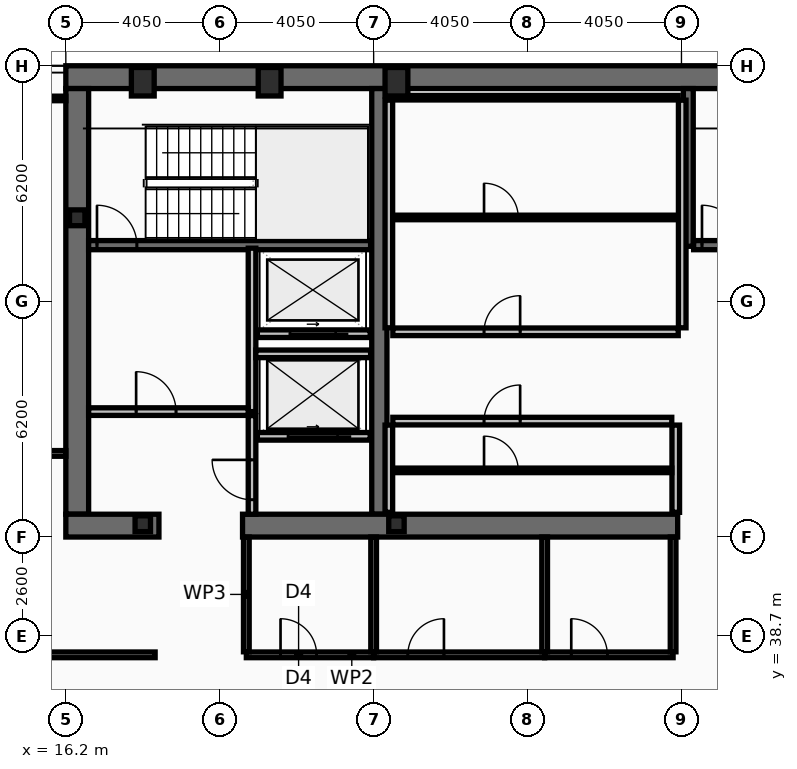
"""IFC4 building model, lengths in metres.
Left out: names, types, materials, properties, quantities, classifications, styles, units other than length and angle.
Written with IfcOpenShell. Run it as: python <this file> out.ifc"""

import sys

from ifc_helpers import new_model, si_unit, direction, frame, frame_2d, origin, origin_2d, place, context, subcontext, project, spatial, rectangle, hollow_rectangle, i_section, extrude, element, fill, save


model = new_model("IFC4")
c1 = context("Model", 3, precision=1e-05, world=origin(), true_north=direction((0.0, 1.0)))
c2 = subcontext(c1, "Body", "Model", "MODEL_VIEW")
j1 = project(units=[si_unit("LENGTHUNIT", "METRE"), si_unit("PLANEANGLEUNIT", "RADIAN")], contexts=[c1])
p1 = place(None, origin())
s1 = spatial("IfcSite", under=j1, at=p1, CompositionType="ELEMENT")
p2 = place(p1, origin())
s2 = spatial("IfcBuilding", under=s1, at=p2, CompositionType="ELEMENT")
p3 = place(p2, frame((0.0, 0.0, 195.8)))
s3 = spatial("IfcBuildingStorey", under=s2, at=p3, CompositionType="ELEMENT", Elevation=195.8)
p4 = place(p3, frame((16.2, 53.4, 0.0), z_axis=(0.0, 0.0, 1.0), x_axis=(1.0, 0.0, 0.0)))
e1 = element("IfcWall", 1, at=p4, inside=s3, PredefinedType="SHEAR", context=c2, shape_type="SweptSolid", body=[
    extrude(rectangle(XDim=40.5, YDim=0.6, at=frame_2d((20.25, 0.0))), origin(), (0.0, 0.0, 1.0), 3.44),
])
p5 = place(p3, frame((16.5, 41.9, 0.0), z_axis=(0.0, 0.0, 1.0), x_axis=(0.0, 1.0, 0.0)))
e2 = element("IfcWall", 2, at=p5, inside=s3, PredefinedType="SHEAR", context=c2, shape_type="SweptSolid", body=[
    extrude(rectangle(XDim=11.2, YDim=0.6, at=frame_2d((5.6, 0.0))), origin(), (0.0, 0.0, 1.0), 3.44),
])
p6 = place(p3, frame((24.45, 41.9, 0.0), z_axis=(0.0, 0.0, 1.0), x_axis=(0.0, 1.0, 0.0)))
e3 = element("IfcWall", 3, at=p6, inside=s3, PredefinedType="SHEAR", context=c2, shape_type="SweptSolid", body=[
    extrude(rectangle(XDim=11.2, YDim=0.4, at=frame_2d((5.6, 0.0))), origin(), (0.0, 0.0, 1.0), 3.44),
])
p7 = place(p3, frame((18.65, 41.6, 0.0), z_axis=(0.0, 0.0, 1.0), x_axis=(-1.0, 0.0, 0.0)))
e4 = element("IfcWall", 4, at=p7, inside=s3, PredefinedType="SHEAR", context=c2, shape_type="SweptSolid", body=[
    extrude(rectangle(XDim=2.45, YDim=0.6, at=frame_2d((1.225, 0.0))), origin(), (0.0, 0.0, 1.0), 3.44),
])
p8 = place(p3, frame((32.3, 41.6, 0.0), z_axis=(0.0, 0.0, 1.0), x_axis=(-1.0, 0.0, 0.0)))
e5 = element("IfcWall", 5, at=p8, inside=s3, PredefinedType="SHEAR", context=c2, shape_type="SweptSolid", body=[
    extrude(rectangle(XDim=11.45, YDim=0.6, at=frame_2d((5.725, 0.0))), origin(), (0.0, 0.0, 1.0), 3.44),
])
p9 = place(p3, frame((32.58, 48.95, 0.0), z_axis=(0.0, 0.0, 1.0), x_axis=(0.0, 1.0, 0.0)))
e6 = element("IfcWall", 6, at=p9, inside=s3, PredefinedType="SHEAR", context=c2, shape_type="SweptSolid", body=[
    extrude(rectangle(XDim=4.15, YDim=0.26, at=frame_2d((2.075, 0.0))), origin(), (0.0, 0.0, 1.0), 3.44),
])
p10 = place(p3, frame((16.8, 48.98, 0.0), z_axis=(0.0, 0.0, 1.0), x_axis=(1.0, 0.0, 0.0)))
e7 = element("IfcWall", 7, at=p10, inside=s3, PredefinedType="SHEAR", context=c2, shape_type="SweptSolid", body=[
    extrude(rectangle(XDim=7.42, YDim=0.24, at=frame_2d((3.71, 0.0))), origin(), (0.0, 0.0, 1.0), 3.44),
])
p11 = place(p10, frame((0.22, 0.0, 0.0)))
e8 = element("IfcOpeningElement", 8, at=p11, cuts=e7, PredefinedType="OPENING", context=c2, shape_type="SweptSolid", body=[
    extrude(rectangle(XDim=1.05, YDim=2.15, at=frame_2d((0.525, 1.075))), frame((0.0, 0.13, 0.0), z_axis=(0.0, -1.0, 0.0), x_axis=(1.0, 0.0, 0.0)), (0.0, 0.0, 1.0), 0.26),
])
p12 = place(p3, frame((32.72, 48.98, 0.0), z_axis=(0.0, 0.0, 1.0), x_axis=(1.0, 0.0, 0.0)))
e9 = element("IfcWall", 9, at=p12, inside=s3, PredefinedType="SHEAR", context=c2, shape_type="SweptSolid", body=[
    extrude(rectangle(XDim=7.56, YDim=0.24, at=frame_2d((3.78, 0.0))), origin(), (0.0, 0.0, 1.0), 3.44),
])
p13 = place(p12, frame((0.22, 0.0, 0.0)))
e10 = element("IfcOpeningElement", 10, at=p13, cuts=e9, PredefinedType="OPENING", context=c2, shape_type="SweptSolid", body=[
    extrude(rectangle(XDim=1.05, YDim=2.15, at=frame_2d((0.525, 1.075))), frame((0.0, 0.13, 0.0), z_axis=(0.0, -1.0, 0.0), x_axis=(1.0, 0.0, 0.0)), (0.0, 0.0, 1.0), 0.26),
])
for number, where, z_axis, x_axis in (
    (11, (18.225, 53.28, 0.0), (0.0, 0.0, 1.0), (1.0, 0.0, 0.0)),
    (12, (21.562, 53.28, 0.0), (0.0, 0.0, 1.0), (1.0, 0.0, 0.0)),
    (13, (24.9, 53.28, 0.0), (0.0, 0.0, 1.0), (1.0, 0.0, 0.0)),
):
    element("IfcColumn", number, at=place(p3, frame(where, z_axis=z_axis, x_axis=x_axis)), inside=s3, PredefinedType="COLUMN", context=c2, shape_type="SweptSolid", body=[
        extrude(hollow_rectangle(XDim=0.6, YDim=0.75, WallThickness=0.045, at=origin_2d()), origin(), (0.0, 0.0, 1.0), 3.6),
    ])
for number, where, z_axis, x_axis in (
    (14, (16.5, 49.7, 0.0), (0.0, 0.0, 1.0), (1.0, 0.0, 0.0)),
    (15, (18.225, 41.65, 0.0), (0.0, 0.0, 1.0), (1.0, 0.0, 0.0)),
    (16, (24.9, 41.65, 0.0), (0.0, 0.0, 1.0), (1.0, 0.0, 0.0)),
):
    element("IfcColumn", number, at=place(p3, frame(where, z_axis=z_axis, x_axis=x_axis)), inside=s3, PredefinedType="COLUMN", context=c2, shape_type="SweptSolid", body=[
        extrude(i_section(OverallWidth=0.406, OverallDepth=0.416, WebThickness=0.03, FlangeThickness=0.048, at=origin_2d()), origin(), (0.0, 0.0, 1.0), 3.6),
    ])
p14 = place(p3, frame((24.21, 43.95, 0.0), z_axis=(0.0, 0.0, 1.0), x_axis=(-1.0, 0.0, 0.0)))
e17 = element("IfcWall", 17, at=p14, inside=s3, PredefinedType="PARTITIONING", context=c2, shape_type="SweptSolid", body=[
    extrude(rectangle(XDim=2.97, YDim=0.2, at=frame_2d((1.485, 0.0))), origin(), (0.0, 0.0, 1.0), 3.44),
])
p15 = place(p14, frame((0.86, 0.0, 0.0)))
e18 = element("IfcOpeningElement", 18, at=p15, cuts=e17, PredefinedType="OPENING", context=c2, shape_type="SweptSolid", body=[
    extrude(rectangle(XDim=1.3, YDim=2.18, at=frame_2d((0.65, 1.09))), frame((0.0, 0.11, 0.0), z_axis=(0.0, -1.0, 0.0), x_axis=(1.0, 0.0, 0.0)), (0.0, 0.0, 1.0), 0.22),
])
p16 = place(p3, frame((24.21, 46.65, 0.0), z_axis=(0.0, 0.0, 1.0), x_axis=(-1.0, 0.0, 0.0)))
e19 = element("IfcWall", 19, at=p16, inside=s3, PredefinedType="PARTITIONING", context=c2, shape_type="SweptSolid", body=[
    extrude(rectangle(XDim=2.97, YDim=0.2, at=frame_2d((1.485, 0.0))), origin(), (0.0, 0.0, 1.0), 3.44),
])
p17 = place(p16, frame((0.91, 0.0, 0.0)))
e20 = element("IfcOpeningElement", 20, at=p17, cuts=e19, PredefinedType="OPENING", context=c2, shape_type="SweptSolid", body=[
    extrude(rectangle(XDim=1.2, YDim=2.18, at=frame_2d((0.6, 1.09))), frame((0.0, 0.11, 0.0), z_axis=(0.0, -1.0, 0.0), x_axis=(1.0, 0.0, 0.0)), (0.0, 0.0, 1.0), 0.22),
])
p18 = place(p3, frame((21.1, 44.6, 0.0), z_axis=(0.0, 0.0, 1.0), x_axis=(0.0, 1.0, 0.0)))
e21 = element("IfcWall", 21, at=p18, inside=s3, PredefinedType="PARTITIONING", context=c2, shape_type="SweptSolid", body=[
    extrude(rectangle(XDim=4.3, YDim=0.2, at=frame_2d((2.15, 0.0))), origin(), (0.0, 0.0, 1.0), 3.44),
])
p19 = place(p3, frame((16.8, 44.6, 0.0), z_axis=(0.0, 0.0, 1.0), x_axis=(1.0, 0.0, 0.0)))
e22 = element("IfcWall", 22, at=p19, inside=s3, PredefinedType="PARTITIONING", context=c2, shape_type="SweptSolid", body=[
    extrude(rectangle(XDim=4.2, YDim=0.2, at=frame_2d((2.1, 0.0))), origin(), (0.0, 0.0, 1.0), 3.44),
])
p20 = place(p19, frame((1.25, 0.0, 0.0)))
e23 = element("IfcOpeningElement", 23, at=p20, cuts=e22, PredefinedType="OPENING", context=c2, shape_type="SweptSolid", body=[
    extrude(rectangle(XDim=1.05, YDim=2.15, at=frame_2d((0.525, 1.075))), frame((0.0, 0.11, 0.0), z_axis=(0.0, -1.0, 0.0), x_axis=(1.0, 0.0, 0.0)), (0.0, 0.0, 1.0), 0.22),
])
p21 = place(p3, frame((21.2, 46.12, 0.0), z_axis=(0.0, 0.0, 1.0), x_axis=(1.0, 0.0, 0.0)))
e24 = element("IfcWall", 24, at=p21, inside=s3, PredefinedType="PARTITIONING", context=c2, shape_type="SweptSolid", body=[
    extrude(rectangle(XDim=3.02, YDim=0.2, at=frame_2d((1.51, 0.0))), origin(), (0.0, 0.0, 1.0), 3.44),
])
p22 = place(p3, frame((21.1, 41.9, 0.0), z_axis=(0.0, 0.0, 1.0), x_axis=(0.0, 1.0, 0.0)))
e25 = element("IfcWall", 25, at=p22, inside=s3, PredefinedType="PARTITIONING", context=c2, shape_type="SweptSolid", body=[
    extrude(rectangle(XDim=2.595, YDim=0.2, at=frame_2d((1.298, 0.0))), origin(), (0.0, 0.0, 1.0), 3.44),
])
p23 = place(p22, frame((0.38, 0.0, 0.0)))
e26 = element("IfcOpeningElement", 26, at=p23, cuts=e25, PredefinedType="OPENING", context=c2, shape_type="SweptSolid", body=[
    extrude(rectangle(XDim=1.05, YDim=2.15, at=frame_2d((0.525, 1.075))), frame((0.0, 0.11, 0.0), z_axis=(0.0, -1.0, 0.0), x_axis=(1.0, 0.0, 0.0)), (0.0, 0.0, 1.0), 0.22),
])
for number, where, z_axis, x_axis in (
    (27, (24.7, 46.805, 0.0), (0.0, 0.0, 1.0), (0.0, 1.0, 0.0)),
    (28, (32.42, 46.805, 0.0), (0.0, 0.0, 1.0), (0.0, 1.0, 0.0)),
):
    element("IfcWall", number, at=place(p3, frame(where, z_axis=z_axis, x_axis=x_axis)), inside=s3, PredefinedType="PARTITIONING", context=c2, shape_type="SweptSolid", body=[
        extrude(rectangle(XDim=5.99, YDim=0.2, at=frame_2d((2.995, 0.0))), origin(), (0.0, 0.0, 1.0), 3.44),
    ])
p24 = place(p3, frame((24.805, 52.86, 0.0), z_axis=(0.0, 0.0, 1.0), x_axis=(1.0, 0.0, 0.0)))
e29 = element("IfcWall", 29, at=p24, inside=s3, PredefinedType="PARTITIONING", context=c2, shape_type="SweptSolid", body=[
    extrude(rectangle(XDim=7.51, YDim=0.12, at=frame_2d((3.755, 0.0))), origin(), (0.0, 0.0, 1.0), 3.44),
])
p25 = place(p3, frame((24.805, 49.709, 0.0), z_axis=(0.0, 0.0, 1.0), x_axis=(1.0, 0.0, 0.0)))
e30 = element("IfcWall", 30, at=p25, inside=s3, PredefinedType="PARTITIONING", context=c2, shape_type="SweptSolid", body=[
    extrude(rectangle(XDim=7.51, YDim=0.12, at=frame_2d((3.755, 0.0))), origin(), (0.0, 0.0, 1.0), 3.44),
])
p26 = place(p25, frame((2.4, 0.0, 0.0)))
e31 = element("IfcOpeningElement", 31, at=p26, cuts=e30, PredefinedType="OPENING", context=c2, shape_type="SweptSolid", body=[
    extrude(rectangle(XDim=0.9, YDim=2.05, at=frame_2d((0.45, 1.025))), frame((0.0, 0.07, 0.0), z_axis=(0.0, -1.0, 0.0), x_axis=(1.0, 0.0, 0.0)), (0.0, 0.0, 1.0), 0.14),
])
p27 = place(p3, frame((24.805, 46.7, 0.0), z_axis=(0.0, 0.0, 1.0), x_axis=(1.0, 0.0, 0.0)))
e32 = element("IfcWall", 32, at=p27, inside=s3, PredefinedType="PARTITIONING", context=c2, shape_type="SweptSolid", body=[
    extrude(rectangle(XDim=7.51, YDim=0.2, at=frame_2d((3.755, 0.0))), origin(), (0.0, 0.0, 1.0), 3.44),
])
p28 = place(p27, frame((2.4, 0.0, 0.0)))
e33 = element("IfcOpeningElement", 33, at=p28, cuts=e32, PredefinedType="OPENING", context=c2, shape_type="SweptSolid", body=[
    extrude(rectangle(XDim=0.95, YDim=2.1, at=frame_2d((0.475, 1.05))), frame((0.0, 0.11, 0.0), z_axis=(0.0, -1.0, 0.0), x_axis=(1.0, 0.0, 0.0)), (0.0, 0.0, 1.0), 0.22),
])
for number, where, z_axis, x_axis in (
    (34, (24.7, 41.95, 0.0), (0.0, 0.0, 1.0), (0.0, 1.0, 0.0)),
    (35, (32.25, 41.95, 0.0), (0.0, 0.0, 1.0), (0.0, 1.0, 0.0)),
):
    element("IfcWall", number, at=place(p3, frame(where, z_axis=z_axis, x_axis=x_axis)), inside=s3, PredefinedType="PARTITIONING", context=c2, shape_type="SweptSolid", body=[
        extrude(rectangle(XDim=2.295, YDim=0.2, at=frame_2d((1.147, 0.0))), origin(), (0.0, 0.0, 1.0), 3.44),
    ])
p29 = place(p3, frame((24.805, 43.054, 0.0), z_axis=(0.0, 0.0, 1.0), x_axis=(1.0, 0.0, 0.0)))
e36 = element("IfcWall", 36, at=p29, inside=s3, PredefinedType="PARTITIONING", context=c2, shape_type="SweptSolid", body=[
    extrude(rectangle(XDim=7.34, YDim=0.12, at=frame_2d((3.67, 0.0))), origin(), (0.0, 0.0, 1.0), 3.44),
])
p30 = place(p29, frame((2.4, 0.0, 0.0)))
e37 = element("IfcOpeningElement", 37, at=p30, cuts=e36, PredefinedType="OPENING", context=c2, shape_type="SweptSolid", body=[
    extrude(rectangle(XDim=0.9, YDim=2.05, at=frame_2d((0.45, 1.025))), frame((0.0, 0.07, 0.0), z_axis=(0.0, -1.0, 0.0), x_axis=(1.0, 0.0, 0.0)), (0.0, 0.0, 1.0), 0.14),
])
p31 = place(p3, frame((24.805, 44.35, 0.0), z_axis=(0.0, 0.0, 1.0), x_axis=(1.0, 0.0, 0.0)))
e38 = element("IfcWall", 38, at=p31, inside=s3, PredefinedType="PARTITIONING", context=c2, shape_type="SweptSolid", body=[
    extrude(rectangle(XDim=7.34, YDim=0.2, at=frame_2d((3.67, 0.0))), origin(), (0.0, 0.0, 1.0), 3.44),
])
p32 = place(p31, frame((2.4, 0.0, 0.0)))
e39 = element("IfcOpeningElement", 39, at=p32, cuts=e38, PredefinedType="OPENING", context=c2, shape_type="SweptSolid", body=[
    extrude(rectangle(XDim=0.95, YDim=2.1, at=frame_2d((0.475, 1.05))), frame((0.0, 0.11, 0.0), z_axis=(0.0, -1.0, 0.0), x_axis=(1.0, 0.0, 0.0)), (0.0, 0.0, 1.0), 0.22),
])
p33 = place(p3, frame((20.95, 38.2, 0.0), z_axis=(0.0, 0.0, 1.0), x_axis=(1.0, 0.0, 0.0)))
e40 = element("IfcWall", 40, at=p33, inside=s3, PredefinedType="PARTITIONING", context=c2, shape_type="SweptSolid", body=[
    extrude(rectangle(XDim=3.35, YDim=0.15, at=frame_2d((1.675, 0.0))), origin(), (0.0, 0.0, 1.0), 3.44),
])
p34 = place(p33, frame((0.9, 0.0, 0.0)))
e41 = element("IfcOpeningElement", 41, at=p34, cuts=e40, PredefinedType="OPENING", context=c2, shape_type="SweptSolid", body=[
    extrude(rectangle(XDim=0.95, YDim=2.05, at=frame_2d((0.475, 1.025))), frame((0.0, 0.085, 0.0), z_axis=(0.0, -1.0, 0.0), x_axis=(1.0, 0.0, 0.0)), (0.0, 0.0, 1.0), 0.17),
])
p35 = place(p3, frame((24.3, 38.2, 0.0), z_axis=(0.0, 0.0, 1.0), x_axis=(1.0, 0.0, 0.0)))
e42 = element("IfcWall", 42, at=p35, inside=s3, PredefinedType="PARTITIONING", context=c2, shape_type="SweptSolid", body=[
    extrude(rectangle(XDim=4.5, YDim=0.15, at=frame_2d((2.25, 0.0))), origin(), (0.0, 0.0, 1.0), 2.73),
])
p36 = place(p35, frame((0.9, 0.0, 0.0)))
e43 = element("IfcOpeningElement", 43, at=p36, cuts=e42, PredefinedType="OPENING", context=c2, shape_type="SweptSolid", body=[
    extrude(rectangle(XDim=0.95, YDim=2.05, at=frame_2d((0.475, 1.025))), frame((0.0, 0.085, 0.0), z_axis=(0.0, -1.0, 0.0), x_axis=(1.0, 0.0, 0.0)), (0.0, 0.0, 1.0), 0.17),
])
p37 = place(p3, frame((28.8, 38.2, 0.0), z_axis=(0.0, 0.0, 1.0), x_axis=(1.0, 0.0, 0.0)))
e44 = element("IfcWall", 44, at=p37, inside=s3, PredefinedType="PARTITIONING", context=c2, shape_type="SweptSolid", body=[
    extrude(rectangle(XDim=3.38, YDim=0.15, at=frame_2d((1.69, 0.0))), origin(), (0.0, 0.0, 1.0), 2.73),
])
p38 = place(p37, frame((0.7, 0.0, 0.0)))
e45 = element("IfcOpeningElement", 45, at=p38, cuts=e44, PredefinedType="OPENING", context=c2, shape_type="SweptSolid", body=[
    extrude(rectangle(XDim=0.95, YDim=2.05, at=frame_2d((0.475, 1.025))), frame((0.0, 0.085, 0.0), z_axis=(0.0, -1.0, 0.0), x_axis=(1.0, 0.0, 0.0)), (0.0, 0.0, 1.0), 0.17),
])
for number, where, z_axis, x_axis in (
    (46, (20.95, 38.28, 0.0), (0.0, 0.0, 1.0), (0.0, 1.0, 0.0)),
    (47, (24.3, 38.28, 0.0), (0.0, 0.0, 1.0), (0.0, 1.0, 0.0)),
    (48, (28.8, 38.28, 0.0), (0.0, 0.0, 1.0), (0.0, 1.0, 0.0)),
    (49, (32.18, 38.28, 0.0), (0.0, 0.0, 1.0), (0.0, 1.0, 0.0)),
):
    element("IfcWall", number, at=place(p3, frame(where, z_axis=z_axis, x_axis=x_axis)), inside=s3, PredefinedType="PARTITIONING", context=c2, shape_type="SweptSolid", body=[
        extrude(rectangle(XDim=3.02, YDim=0.15, at=frame_2d((1.51, 0.0))), origin(), (0.0, 0.0, 1.0), 3.44),
    ])
p39 = place(p3, frame((8.03, 38.2, 0.0), z_axis=(0.0, 0.0, 1.0), x_axis=(1.0, 0.0, 0.0)))
e50 = element("IfcWall", 50, at=p39, inside=s3, PredefinedType="PARTITIONING", context=c2, shape_type="SweptSolid", body=[
    extrude(rectangle(XDim=10.52, YDim=0.15, at=frame_2d((5.26, 0.0))), origin(), (0.0, 0.0, 1.0), 2.73),
])
p40 = place(p39, frame((6.32, 0.0, 0.0)))
e51 = element("IfcOpeningElement", 51, at=p40, cuts=e50, PredefinedType="OPENING", context=c2, shape_type="SweptSolid", body=[
    extrude(rectangle(XDim=0.95, YDim=2.05, at=frame_2d((0.475, 1.025))), frame((0.0, 0.085, 0.0), z_axis=(0.0, -1.0, 0.0), x_axis=(1.0, 0.0, 0.0)), (0.0, 0.0, 1.0), 0.17),
])
p41 = place(p3, frame((8.095, 43.5, 0.0), z_axis=(0.0, 0.0, 1.0), x_axis=(1.0, 0.0, 0.0)))
e52 = element("IfcWall", 52, at=p41, inside=s3, PredefinedType="PARTITIONING", context=c2, shape_type="SweptSolid", body=[
    extrude(rectangle(XDim=8.105, YDim=0.15, at=frame_2d((4.052, 0.0))), origin(), (0.0, 0.0, 1.0), 2.73),
])
p42 = place(p41, frame((6.32, 0.0, 0.0)))
e53 = element("IfcOpeningElement", 53, at=p42, cuts=e52, PredefinedType="OPENING", context=c2, shape_type="SweptSolid", body=[
    extrude(rectangle(XDim=0.9, YDim=2.05, at=frame_2d((0.45, 1.025))), frame((0.0, 0.085, 0.0), z_axis=(0.0, -1.0, 0.0), x_axis=(1.0, 0.0, 0.0)), (0.0, 0.0, 1.0), 0.17),
])
p43 = place(p3, frame((8.095, 52.84, 0.0), z_axis=(0.0, 0.0, 1.0), x_axis=(1.0, 0.0, 0.0)))
e54 = element("IfcWall", 54, at=p43, inside=s3, PredefinedType="PARTITIONING", context=c2, shape_type="SweptSolid", body=[
    extrude(rectangle(XDim=8.105, YDim=0.12, at=frame_2d((4.052, 0.0))), origin(), (0.0, 0.0, 1.0), 3.44),
])
p44 = place(p11, origin())
e55 = element("IfcDoor", 55, at=p44, inside=s3, OperationType="SINGLE_SWING_LEFT", PredefinedType="DOOR", context=c2, shape_type="SweptSolid", body=[
    extrude(rectangle(XDim=1.05, YDim=2.15, at=frame_2d((0.525, 1.075))), frame((0.0, 0.025, 0.0), z_axis=(0.0, -1.0, 0.0), x_axis=(1.0, 0.0, 0.0)), (0.0, 0.0, 1.0), 0.05),
])
fill(e8, e55)
p45 = place(p13, origin())
e56 = element("IfcDoor", 56, at=p45, inside=s3, OperationType="SINGLE_SWING_LEFT", PredefinedType="DOOR", context=c2, shape_type="SweptSolid", body=[
    extrude(rectangle(XDim=1.05, YDim=2.15, at=frame_2d((0.525, 1.075))), frame((0.0, 0.025, 0.0), z_axis=(0.0, -1.0, 0.0), x_axis=(1.0, 0.0, 0.0)), (0.0, 0.0, 1.0), 0.05),
])
fill(e10, e56)
p46 = place(p15, origin())
e57 = element("IfcDoor", 57, at=p46, inside=s3, OperationType="SLIDING_TO_LEFT", PredefinedType="DOOR", context=c2, shape_type="SweptSolid", body=[
    extrude(rectangle(XDim=1.3, YDim=2.18, at=frame_2d((0.65, 1.09))), frame((0.0, 0.025, 0.0), z_axis=(0.0, -1.0, 0.0), x_axis=(1.0, 0.0, 0.0)), (0.0, 0.0, 1.0), 0.05),
])
fill(e18, e57)
p47 = place(p17, origin())
e58 = element("IfcDoor", 58, at=p47, inside=s3, OperationType="SLIDING_TO_LEFT", PredefinedType="DOOR", context=c2, shape_type="SweptSolid", body=[
    extrude(rectangle(XDim=1.2, YDim=2.18, at=frame_2d((0.6, 1.09))), frame((0.0, 0.025, 0.0), z_axis=(0.0, -1.0, 0.0), x_axis=(1.0, 0.0, 0.0)), (0.0, 0.0, 1.0), 0.05),
])
fill(e20, e58)
p48 = place(p20, origin())
e59 = element("IfcDoor", 59, at=p48, inside=s3, OperationType="SINGLE_SWING_LEFT", PredefinedType="DOOR", context=c2, shape_type="SweptSolid", body=[
    extrude(rectangle(XDim=1.05, YDim=2.15, at=frame_2d((0.525, 1.075))), frame((0.0, 0.025, 0.0), z_axis=(0.0, -1.0, 0.0), x_axis=(1.0, 0.0, 0.0)), (0.0, 0.0, 1.0), 0.05),
])
fill(e23, e59)
p49 = place(p23, origin())
e60 = element("IfcDoor", 60, at=p49, inside=s3, OperationType="SINGLE_SWING_RIGHT", PredefinedType="DOOR", context=c2, shape_type="SweptSolid", body=[
    extrude(rectangle(XDim=1.05, YDim=2.15, at=frame_2d((0.525, 1.075))), frame((0.0, 0.025, 0.0), z_axis=(0.0, -1.0, 0.0), x_axis=(1.0, 0.0, 0.0)), (0.0, 0.0, 1.0), 0.05),
])
fill(e26, e60)
p50 = place(p26, origin())
e61 = element("IfcDoor", 61, at=p50, inside=s3, OperationType="SINGLE_SWING_LEFT", PredefinedType="DOOR", context=c2, shape_type="SweptSolid", body=[
    extrude(rectangle(XDim=0.9, YDim=2.05, at=frame_2d((0.45, 1.025))), frame((0.0, 0.025, 0.0), z_axis=(0.0, -1.0, 0.0), x_axis=(1.0, 0.0, 0.0)), (0.0, 0.0, 1.0), 0.05),
])
fill(e31, e61)
p51 = place(p28, origin())
e62 = element("IfcDoor", 62, at=p51, inside=s3, OperationType="SINGLE_SWING_RIGHT", PredefinedType="DOOR", context=c2, shape_type="SweptSolid", body=[
    extrude(rectangle(XDim=0.95, YDim=2.1, at=frame_2d((0.475, 1.05))), frame((0.0, 0.025, 0.0), z_axis=(0.0, -1.0, 0.0), x_axis=(1.0, 0.0, 0.0)), (0.0, 0.0, 1.0), 0.05),
])
fill(e33, e62)
p52 = place(p30, origin())
e63 = element("IfcDoor", 63, at=p52, inside=s3, OperationType="SINGLE_SWING_LEFT", PredefinedType="DOOR", context=c2, shape_type="SweptSolid", body=[
    extrude(rectangle(XDim=0.9, YDim=2.05, at=frame_2d((0.45, 1.025))), frame((0.0, 0.025, 0.0), z_axis=(0.0, -1.0, 0.0), x_axis=(1.0, 0.0, 0.0)), (0.0, 0.0, 1.0), 0.05),
])
fill(e37, e63)
p53 = place(p32, origin())
e64 = element("IfcDoor", 64, at=p53, inside=s3, OperationType="SINGLE_SWING_RIGHT", PredefinedType="DOOR", context=c2, shape_type="SweptSolid", body=[
    extrude(rectangle(XDim=0.95, YDim=2.1, at=frame_2d((0.475, 1.05))), frame((0.0, 0.025, 0.0), z_axis=(0.0, -1.0, 0.0), x_axis=(1.0, 0.0, 0.0)), (0.0, 0.0, 1.0), 0.05),
])
fill(e39, e64)
p54 = place(p34, origin())
e65 = element("IfcDoor", 65, at=p54, inside=s3, OperationType="SINGLE_SWING_LEFT", PredefinedType="DOOR", context=c2, shape_type="SweptSolid", body=[
    extrude(rectangle(XDim=0.95, YDim=2.05, at=frame_2d((0.475, 1.025))), frame((0.0, 0.025, 0.0), z_axis=(0.0, -1.0, 0.0), x_axis=(1.0, 0.0, 0.0)), (0.0, 0.0, 1.0), 0.05),
])
fill(e41, e65)
p55 = place(p36, origin())
e66 = element("IfcDoor", 66, at=p55, inside=s3, OperationType="SINGLE_SWING_RIGHT", PredefinedType="DOOR", context=c2, shape_type="SweptSolid", body=[
    extrude(rectangle(XDim=0.95, YDim=2.05, at=frame_2d((0.475, 1.025))), frame((0.0, 0.025, 0.0), z_axis=(0.0, -1.0, 0.0), x_axis=(1.0, 0.0, 0.0)), (0.0, 0.0, 1.0), 0.05),
])
fill(e43, e66)
p56 = place(p38, origin())
e67 = element("IfcDoor", 67, at=p56, inside=s3, OperationType="SINGLE_SWING_LEFT", PredefinedType="DOOR", context=c2, shape_type="SweptSolid", body=[
    extrude(rectangle(XDim=0.95, YDim=2.05, at=frame_2d((0.475, 1.025))), frame((0.0, 0.025, 0.0), z_axis=(0.0, -1.0, 0.0), x_axis=(1.0, 0.0, 0.0)), (0.0, 0.0, 1.0), 0.05),
])
fill(e45, e67)
save(model, sys.argv[1])
